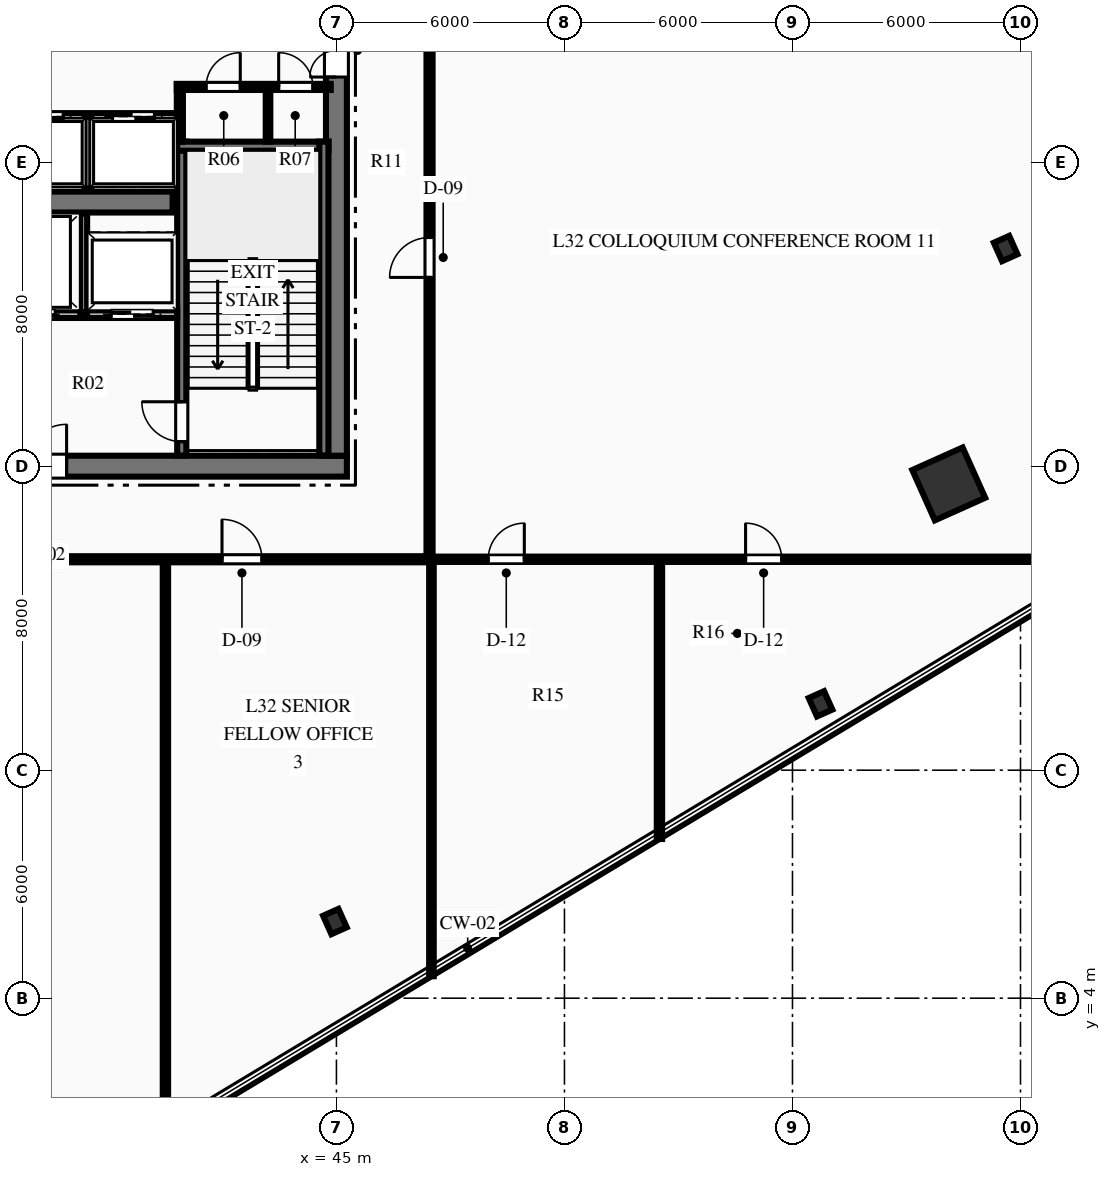
"""IFC4 building model, lengths in metres.
Left out: names, types, materials, properties, quantities, classifications, styles, units other than length and angle.
Written with IfcOpenShell. Run it as: python <this file> out.ifc"""

import sys

from ifc_helpers import new_model, si_unit, direction, frame, frame_2d, origin, origin_2d, place, context, subcontext, project, spatial, rectangle, hollow_rectangle, i_section, extrude, element, fill, save


model = new_model("IFC4")
c1 = context("Model", 3, precision=1e-05, world=origin(), true_north=direction((0.0, 1.0)))
c2 = subcontext(c1, "Body", "Model", "MODEL_VIEW")
j1 = project(units=[si_unit("LENGTHUNIT", "METRE"), si_unit("PLANEANGLEUNIT", "RADIAN")], contexts=[c1])
p1 = place(None, origin())
s1 = spatial("IfcSite", under=j1, at=p1, CompositionType="ELEMENT")
p2 = place(p1, origin())
s2 = spatial("IfcBuilding", under=s1, at=p2, CompositionType="ELEMENT")
p3 = place(p2, frame((0.0, 0.0, 131.7)))
s3 = spatial("IfcBuildingStorey", under=s2, at=p3, CompositionType="ELEMENT", Elevation=131.7)
p4 = place(p3, frame((26.725, 18.0, 0.0), z_axis=(0.0, 0.0, 1.0), x_axis=(1.0, 0.0, 0.0)))
e1 = element("IfcWall", 1, at=p4, inside=s3, PredefinedType="SHEAR", context=c2, shape_type="SweptSolid", body=[
    extrude(rectangle(XDim=18.55, YDim=0.55, at=frame_2d((9.275, 0.0))), origin(), (0.0, 0.0, 1.0), 4.5),
])
p5 = place(p4, frame((7.375, 0.0, 0.0)))
e2 = element("IfcOpeningElement", 2, at=p5, cuts=e1, PredefinedType="OPENING", context=c2, shape_type="SweptSolid", body=[
    extrude(rectangle(XDim=1.1, YDim=2.15, at=frame_2d((0.55, 1.075))), frame((0.0, 0.285, 0.0), z_axis=(0.0, -1.0, 0.0), x_axis=(1.0, 0.0, 0.0)), (0.0, 0.0, 1.0), 0.57),
])
p6 = place(p4, frame((10.075, 0.0, 0.0)))
e3 = element("IfcOpeningElement", 3, at=p6, cuts=e1, PredefinedType="OPENING", context=c2, shape_type="SweptSolid", body=[
    extrude(rectangle(XDim=1.1, YDim=2.15, at=frame_2d((0.55, 1.075))), frame((0.0, 0.285, 0.0), z_axis=(0.0, -1.0, 0.0), x_axis=(1.0, 0.0, 0.0)), (0.0, 0.0, 1.0), 0.57),
])
p7 = place(p3, frame((45.0, 18.275, 0.0), z_axis=(0.0, 0.0, 1.0), x_axis=(0.0, 1.0, 0.0)))
e4 = element("IfcWall", 4, at=p7, inside=s3, PredefinedType="SHEAR", context=c2, shape_type="SweptSolid", body=[
    extrude(rectangle(XDim=15.45, YDim=0.55, at=frame_2d((7.725, 0.0))), origin(), (0.0, 0.0, 1.0), 4.5),
])
p8 = place(p7, frame((9.965, 0.0, 0.0)))
e5 = element("IfcOpeningElement", 5, at=p8, cuts=e4, PredefinedType="OPENING", context=c2, shape_type="SweptSolid", body=[
    extrude(rectangle(XDim=1.4, YDim=2.2, at=frame_2d((0.7, 1.1))), frame((0.0, 0.285, 0.0), z_axis=(0.0, -1.0, 0.0), x_axis=(1.0, 0.0, 0.0)), (0.0, 0.0, 1.0), 0.57),
])
p9 = place(p3, frame((31.31, 24.95, 0.0), z_axis=(0.0, 0.0, 1.0), x_axis=(1.0, 0.0, 0.0)))
e6 = element("IfcWall", 6, at=p9, inside=s3, PredefinedType="SHEAR", context=c2, shape_type="SweptSolid", body=[
    extrude(rectangle(XDim=9.38, YDim=0.55, at=frame_2d((4.69, 0.0))), origin(), (0.0, 0.0, 1.0), 4.5),
])
p10 = place(p3, frame((40.93, 18.28, 0.0), z_axis=(0.0, 0.0, 1.0), x_axis=(0.0, 1.0, 0.0)))
e7 = element("IfcWall", 7, at=p10, inside=s3, PredefinedType="SHEAR", context=c2, shape_type="SweptSolid", body=[
    extrude(rectangle(XDim=8.26, YDim=0.24, at=frame_2d((4.13, 0.0))), origin(), (0.0, 0.0, 1.0), 4.5),
])
p11 = place(p10, frame((0.365, 0.0, 0.0)))
e8 = element("IfcOpeningElement", 8, at=p11, cuts=e7, PredefinedType="OPENING", context=c2, shape_type="SweptSolid", body=[
    extrude(rectangle(XDim=1.05, YDim=2.15, at=frame_2d((0.525, 1.075))), frame((0.0, 0.13, 0.0), z_axis=(0.0, -1.0, 0.0), x_axis=(1.0, 0.0, 0.0)), (0.0, 0.0, 1.0), 0.26),
])
p12 = place(p3, frame((40.81, 26.42, 0.0), z_axis=(0.0, 0.0, 1.0), x_axis=(1.0, 0.0, 0.0)))
e9 = element("IfcWall", 9, at=p12, inside=s3, PredefinedType="SHEAR", context=c2, shape_type="SweptSolid", body=[
    extrude(rectangle(XDim=3.98, YDim=0.24, at=frame_2d((1.99, 0.0))), origin(), (0.0, 0.0, 1.0), 4.5),
])
p13 = place(p3, frame((44.67, 18.28, 0.0), z_axis=(0.0, 0.0, 1.0), x_axis=(0.0, 1.0, 0.0)))
e10 = element("IfcWall", 10, at=p13, inside=s3, PredefinedType="SHEAR", context=c2, shape_type="SweptSolid", body=[
    extrude(rectangle(XDim=8.26, YDim=0.24, at=frame_2d((4.13, 0.0))), origin(), (0.0, 0.0, 1.0), 4.5),
])
p14 = place(p3, frame((61.112, 17.533, 0.0), z_axis=(0.0, 0.0, 1.0), x_axis=(0.912477494148, 0.409126902895, 0.0)))
e11 = element("IfcColumn", 11, at=p14, inside=s3, PredefinedType="COLUMN", context=c2, shape_type="SweptSolid", body=[
    extrude(hollow_rectangle(XDim=1.45, YDim=1.45, WallThickness=0.07, at=origin_2d()), origin(), (0.0, 0.0, 1.0), 4.5),
])
for number, where, z_axis, x_axis in (
    (12, (44.96, 6.017, 0.0), (0.0, 0.0, 1.0), (0.912, 0.409, 0.0)),
    (13, (57.738, 11.746, 0.0), (0.0, 0.0, 1.0), (0.912, 0.409, 0.0)),
    (14, (62.609, 23.727, 0.0), (0.0, 0.0, 1.0), (0.912, 0.409, 0.0)),
):
    element("IfcColumn", number, at=place(p3, frame(where, z_axis=z_axis, x_axis=x_axis)), inside=s3, PredefinedType="COLUMN", context=c2, shape_type="SweptSolid", body=[
        extrude(i_section(OverallWidth=0.442, OverallDepth=0.531, WebThickness=0.066, FlangeThickness=0.106, at=origin_2d()), origin(), (0.0, 0.0, 1.0), 4.5),
    ])
p15 = place(p3, frame((36.12, 22.0, 0.0), z_axis=(0.0, 0.0, 1.0), x_axis=(1.0, 0.0, 0.0)))
e15 = element("IfcWall", 15, at=p15, inside=s3, PredefinedType="PARTITIONING", context=c2, shape_type="SweptSolid", body=[
    extrude(rectangle(XDim=4.69, YDim=0.2, at=frame_2d((2.345, 0.0))), origin(), (0.0, 0.0, 1.0), 4.1),
])
p16 = place(p15, frame((2.955, 0.0, 0.0)))
e16 = element("IfcOpeningElement", 16, at=p16, cuts=e15, PredefinedType="OPENING", context=c2, shape_type="SweptSolid", body=[
    extrude(rectangle(XDim=1.1, YDim=2.15, at=frame_2d((0.55, 1.075))), frame((0.0, 0.11, 0.0), z_axis=(0.0, -1.0, 0.0), x_axis=(1.0, 0.0, 0.0)), (0.0, 0.0, 1.0), 0.22),
])
p17 = place(p15, frame((0.08, 0.0, 0.0)))
e17 = element("IfcOpeningElement", 17, at=p17, cuts=e15, PredefinedType="OPENING", context=c2, shape_type="SweptSolid", body=[
    extrude(rectangle(XDim=1.4, YDim=2.2, at=frame_2d((0.7, 1.1))), frame((0.0, 0.11, 0.0), z_axis=(0.0, -1.0, 0.0), x_axis=(1.0, 0.0, 0.0)), (0.0, 0.0, 1.0), 0.22),
])
p18 = place(p3, frame((38.35, 22.05, 0.0), z_axis=(0.0, 0.0, 1.0), x_axis=(0.0, 1.0, 0.0)))
e18 = element("IfcWall", 18, at=p18, inside=s3, PredefinedType="PARTITIONING", context=c2, shape_type="SweptSolid", body=[
    extrude(rectangle(XDim=2.6, YDim=0.18, at=frame_2d((1.3, 0.0))), origin(), (0.0, 0.0, 1.0), 4.1),
])
p19 = place(p3, frame((40.8, 27.98, 0.0), z_axis=(0.0, 0.0, 1.0), x_axis=(1.0, 0.0, 0.0)))
e19 = element("IfcWall", 19, at=p19, inside=s3, PredefinedType="PARTITIONING", context=c2, shape_type="SweptSolid", body=[
    extrude(rectangle(XDim=4.05, YDim=0.16, at=frame_2d((2.025, 0.0))), origin(), (0.0, 0.0, 1.0), 4.1),
])
p20 = place(p19, frame((0.77, 0.0, 0.0)))
e20 = element("IfcOpeningElement", 20, at=p20, cuts=e19, PredefinedType="OPENING", context=c2, shape_type="SweptSolid", body=[
    extrude(rectangle(XDim=0.9, YDim=2.15, at=frame_2d((0.45, 1.075))), frame((0.0, 0.09, 0.0), z_axis=(0.0, -1.0, 0.0), x_axis=(1.0, 0.0, 0.0)), (0.0, 0.0, 1.0), 0.18),
])
p21 = place(p19, frame((2.68, 0.0, 0.0)))
e21 = element("IfcOpeningElement", 21, at=p21, cuts=e19, PredefinedType="OPENING", context=c2, shape_type="SweptSolid", body=[
    extrude(rectangle(XDim=0.9, YDim=2.15, at=frame_2d((0.45, 1.075))), frame((0.0, 0.09, 0.0), z_axis=(0.0, -1.0, 0.0), x_axis=(1.0, 0.0, 0.0)), (0.0, 0.0, 1.0), 0.18),
])
p22 = place(p3, frame((40.88, 26.54, 0.0), z_axis=(0.0, 0.0, 1.0), x_axis=(0.0, 1.0, 0.0)))
e22 = element("IfcWall", 22, at=p22, inside=s3, PredefinedType="PARTITIONING", context=c2, shape_type="SweptSolid", body=[
    extrude(rectangle(XDim=1.51, YDim=0.16, at=frame_2d((0.755, 0.0))), origin(), (0.0, 0.0, 1.0), 4.1),
])
p23 = place(p3, frame((43.2, 26.54, 0.0), z_axis=(0.0, 0.0, 1.0), x_axis=(0.0, 1.0, 0.0)))
e23 = element("IfcWall", 23, at=p23, inside=s3, PredefinedType="PARTITIONING", context=c2, shape_type="SweptSolid", body=[
    extrude(rectangle(XDim=1.44, YDim=0.12, at=frame_2d((0.72, 0.0))), origin(), (0.0, 0.0, 1.0), 4.1),
])
p24 = place(p3, frame((31.2, 27.2, 0.0), z_axis=(0.0, 0.0, 1.0), x_axis=(1.0, 0.0, 0.0)))
e24 = element("IfcWall", 24, at=p24, inside=s3, PredefinedType="PARTITIONING", context=c2, shape_type="SweptSolid", body=[
    extrude(rectangle(XDim=9.6, YDim=0.18, at=frame_2d((4.8, 0.0))), origin(), (0.0, 0.0, 1.0), 4.1),
])
p25 = place(p24, frame((0.59, 0.0, 0.0)))
e25 = element("IfcOpeningElement", 25, at=p25, cuts=e24, PredefinedType="OPENING", context=c2, shape_type="SweptSolid", body=[
    extrude(rectangle(XDim=1.1, YDim=2.15, at=frame_2d((0.55, 1.075))), frame((0.0, 0.1, 0.0), z_axis=(0.0, -1.0, 0.0), x_axis=(1.0, 0.0, 0.0)), (0.0, 0.0, 1.0), 0.2),
])
p26 = place(p24, frame((2.99, 0.0, 0.0)))
e26 = element("IfcOpeningElement", 26, at=p26, cuts=e24, PredefinedType="OPENING", context=c2, shape_type="SweptSolid", body=[
    extrude(rectangle(XDim=1.1, YDim=2.15, at=frame_2d((0.55, 1.075))), frame((0.0, 0.1, 0.0), z_axis=(0.0, -1.0, 0.0), x_axis=(1.0, 0.0, 0.0)), (0.0, 0.0, 1.0), 0.2),
])
p27 = place(p24, frame((5.51, 0.0, 0.0)))
e27 = element("IfcOpeningElement", 27, at=p27, cuts=e24, PredefinedType="OPENING", context=c2, shape_type="SweptSolid", body=[
    extrude(rectangle(XDim=1.1, YDim=2.15, at=frame_2d((0.55, 1.075))), frame((0.0, 0.1, 0.0), z_axis=(0.0, -1.0, 0.0), x_axis=(1.0, 0.0, 0.0)), (0.0, 0.0, 1.0), 0.2),
])
p28 = place(p24, frame((7.91, 0.0, 0.0)))
e28 = element("IfcOpeningElement", 28, at=p28, cuts=e24, PredefinedType="OPENING", context=c2, shape_type="SweptSolid", body=[
    extrude(rectangle(XDim=1.1, YDim=2.15, at=frame_2d((0.55, 1.075))), frame((0.0, 0.1, 0.0), z_axis=(0.0, -1.0, 0.0), x_axis=(1.0, 0.0, 0.0)), (0.0, 0.0, 1.0), 0.2),
])
p29 = place(p3, frame((38.46, 25.3, 0.0), z_axis=(0.0, 0.0, 1.0), x_axis=(0.0, 1.0, 0.0)))
e29 = element("IfcWall", 29, at=p29, inside=s3, PredefinedType="PARTITIONING", context=c2, shape_type="SweptSolid", body=[
    extrude(rectangle(XDim=1.9, YDim=0.18, at=frame_2d((0.95, 0.0))), origin(), (0.0, 0.0, 1.0), 4.1),
])
p30 = place(p3, frame((24.5, 15.55, 0.0), z_axis=(0.0, 0.0, 1.0), x_axis=(1.0, 0.0, 0.0)))
e30 = element("IfcWall", 30, at=p30, inside=s3, PredefinedType="PARTITIONING", context=c2, shape_type="SweptSolid", body=[
    extrude(rectangle(XDim=23.0, YDim=0.16, at=frame_2d((11.5, 0.0))), origin(), (0.0, 0.0, 1.0), 4.1),
])
p31 = place(p30, frame((7.725, 0.0, 0.0)))
e31 = element("IfcOpeningElement", 31, at=p31, cuts=e30, PredefinedType="OPENING", context=c2, shape_type="SweptSolid", body=[
    extrude(rectangle(XDim=1.05, YDim=2.15, at=frame_2d((0.525, 1.075))), frame((0.0, 0.09, 0.0), z_axis=(0.0, -1.0, 0.0), x_axis=(1.0, 0.0, 0.0)), (0.0, 0.0, 1.0), 0.18),
])
p32 = place(p30, frame((17.489, 0.0, 0.0)))
e32 = element("IfcOpeningElement", 32, at=p32, cuts=e30, PredefinedType="OPENING", context=c2, shape_type="SweptSolid", body=[
    extrude(rectangle(XDim=1.05, YDim=2.15, at=frame_2d((0.525, 1.075))), frame((0.0, 0.09, 0.0), z_axis=(0.0, -1.0, 0.0), x_axis=(1.0, 0.0, 0.0)), (0.0, 0.0, 1.0), 0.18),
])
p33 = place(p3, frame((47.45, 15.55, 0.0), z_axis=(0.0, 0.0, 1.0), x_axis=(0.0, 1.0, 0.0)))
e33 = element("IfcWall", 33, at=p33, inside=s3, PredefinedType="PARTITIONING", context=c2, shape_type="SweptSolid", body=[
    extrude(rectangle(XDim=20.9, YDim=0.16, at=frame_2d((10.45, 0.0))), origin(), (0.0, 0.0, 1.0), 4.1),
])
p34 = place(p33, frame((7.417, 0.0, 0.0)))
e34 = element("IfcOpeningElement", 34, at=p34, cuts=e33, PredefinedType="OPENING", context=c2, shape_type="SweptSolid", body=[
    extrude(rectangle(XDim=1.05, YDim=2.15, at=frame_2d((0.525, 1.075))), frame((0.0, 0.09, 0.0), z_axis=(0.0, -1.0, 0.0), x_axis=(1.0, 0.0, 0.0)), (0.0, 0.0, 1.0), 0.18),
])
p35 = place(p3, frame((47.45, 15.55, 0.0), z_axis=(0.0, 0.0, 1.0), x_axis=(1.0, 0.0, 0.0)))
e35 = element("IfcWall", 35, at=p35, inside=s3, PredefinedType="PARTITIONING", context=c2, shape_type="SweptSolid", body=[
    extrude(rectangle(XDim=18.276, YDim=0.14, at=frame_2d((9.138, 0.0))), origin(), (0.0, 0.0, 1.0), 4.1),
])
p36 = place(p35, frame((1.544, 0.0, 0.0)))
e36 = element("IfcOpeningElement", 36, at=p36, cuts=e35, PredefinedType="OPENING", context=c2, shape_type="SweptSolid", body=[
    extrude(rectangle(XDim=0.95, YDim=2.15, at=frame_2d((0.475, 1.075))), frame((0.0, 0.08, 0.0), z_axis=(0.0, -1.0, 0.0), x_axis=(1.0, 0.0, 0.0)), (0.0, 0.0, 1.0), 0.16),
])
p37 = place(p35, frame((8.316, 0.0, 0.0)))
e37 = element("IfcOpeningElement", 37, at=p37, cuts=e35, PredefinedType="OPENING", context=c2, shape_type="SweptSolid", body=[
    extrude(rectangle(XDim=0.95, YDim=2.15, at=frame_2d((0.475, 1.075))), frame((0.0, 0.08, 0.0), z_axis=(0.0, -1.0, 0.0), x_axis=(1.0, 0.0, 0.0)), (0.0, 0.0, 1.0), 0.16),
])
p38 = place(p3, frame((40.5, 0.363, 0.0), z_axis=(0.0, 0.0, 1.0), x_axis=(0.0, 1.0, 0.0)))
e38 = element("IfcWall", 38, at=p38, inside=s3, PredefinedType="PARTITIONING", context=c2, shape_type="SweptSolid", body=[
    extrude(rectangle(XDim=15.187, YDim=0.14, at=frame_2d((7.594, 0.0))), origin(), (0.0, 0.0, 1.0), 4.1),
])
p39 = place(p3, frame((47.5, 4.577, 0.0), z_axis=(0.0, 0.0, 1.0), x_axis=(0.0, 1.0, 0.0)))
e39 = element("IfcWall", 39, at=p39, inside=s3, PredefinedType="PARTITIONING", context=c2, shape_type="SweptSolid", body=[
    extrude(rectangle(XDim=10.973, YDim=0.12, at=frame_2d((5.487, 0.0))), origin(), (0.0, 0.0, 1.0), 4.1),
])
p40 = place(p3, frame((53.5, 8.189, 0.0), z_axis=(0.0, 0.0, 1.0), x_axis=(0.0, 1.0, 0.0)))
e40 = element("IfcWall", 40, at=p40, inside=s3, PredefinedType="PARTITIONING", context=c2, shape_type="SweptSolid", body=[
    extrude(rectangle(XDim=7.361, YDim=0.14, at=frame_2d((3.68, 0.0))), origin(), (0.0, 0.0, 1.0), 4.1),
])
p41 = place(p20, origin())
e41 = element("IfcDoor", 41, at=p41, inside=s3, OperationType="SINGLE_SWING_RIGHT", PredefinedType="DOOR", context=c2, shape_type="SweptSolid", body=[
    extrude(rectangle(XDim=0.9, YDim=2.15, at=frame_2d((0.45, 1.075))), frame((0.0, 0.025, 0.0), z_axis=(0.0, -1.0, 0.0), x_axis=(1.0, 0.0, 0.0)), (0.0, 0.0, 1.0), 0.05),
])
fill(e20, e41)
p42 = place(p21, origin())
e42 = element("IfcDoor", 42, at=p42, inside=s3, OperationType="SINGLE_SWING_LEFT", PredefinedType="DOOR", context=c2, shape_type="SweptSolid", body=[
    extrude(rectangle(XDim=0.9, YDim=2.15, at=frame_2d((0.45, 1.075))), frame((0.0, 0.025, 0.0), z_axis=(0.0, -1.0, 0.0), x_axis=(1.0, 0.0, 0.0)), (0.0, 0.0, 1.0), 0.05),
])
fill(e21, e42)
p43 = place(p11, origin())
e43 = element("IfcDoor", 43, at=p43, inside=s3, OperationType="SINGLE_SWING_RIGHT", PredefinedType="DOOR", context=c2, shape_type="SweptSolid", body=[
    extrude(rectangle(XDim=1.05, YDim=2.15, at=frame_2d((0.525, 1.075))), frame((0.0, 0.025, 0.0), z_axis=(0.0, -1.0, 0.0), x_axis=(1.0, 0.0, 0.0)), (0.0, 0.0, 1.0), 0.05),
])
fill(e8, e43)
p44 = place(p6, origin())
e44 = element("IfcDoor", 44, at=p44, inside=s3, OperationType="SINGLE_SWING_RIGHT", PredefinedType="DOOR", context=c2, shape_type="SweptSolid", body=[
    extrude(rectangle(XDim=1.1, YDim=2.15, at=frame_2d((0.55, 1.075))), frame((0.0, 0.025, 0.0), z_axis=(0.0, -1.0, 0.0), x_axis=(1.0, 0.0, 0.0)), (0.0, 0.0, 1.0), 0.05),
])
fill(e3, e44)
p45 = place(p8, origin())
e45 = element("IfcDoor", 45, at=p45, inside=s3, OperationType="DOUBLE_DOOR_SINGLE_SWING", PredefinedType="DOOR", context=c2, shape_type="SweptSolid", body=[
    extrude(rectangle(XDim=1.4, YDim=2.2, at=frame_2d((0.7, 1.1))), frame((0.0, 0.025, 0.0), z_axis=(0.0, -1.0, 0.0), x_axis=(1.0, 0.0, 0.0)), (0.0, 0.0, 1.0), 0.05),
])
fill(e5, e45)
p46 = place(p32, origin())
e46 = element("IfcDoor", 46, at=p46, inside=s3, OperationType="SINGLE_SWING_LEFT", PredefinedType="DOOR", context=c2, shape_type="SweptSolid", body=[
    extrude(rectangle(XDim=1.05, YDim=2.15, at=frame_2d((0.525, 1.075))), frame((0.0, 0.025, 0.0), z_axis=(0.0, -1.0, 0.0), x_axis=(1.0, 0.0, 0.0)), (0.0, 0.0, 1.0), 0.05),
])
fill(e32, e46)
p47 = place(p36, origin())
e47 = element("IfcDoor", 47, at=p47, inside=s3, OperationType="SINGLE_SWING_RIGHT", PredefinedType="DOOR", context=c2, shape_type="SweptSolid", body=[
    extrude(rectangle(XDim=0.95, YDim=2.15, at=frame_2d((0.475, 1.075))), frame((0.0, 0.025, 0.0), z_axis=(0.0, -1.0, 0.0), x_axis=(1.0, 0.0, 0.0)), (0.0, 0.0, 1.0), 0.05),
])
fill(e36, e47)
p48 = place(p37, origin())
e48 = element("IfcDoor", 48, at=p48, inside=s3, OperationType="SINGLE_SWING_LEFT", PredefinedType="DOOR", context=c2, shape_type="SweptSolid", body=[
    extrude(rectangle(XDim=0.95, YDim=2.15, at=frame_2d((0.475, 1.075))), frame((0.0, 0.025, 0.0), z_axis=(0.0, -1.0, 0.0), x_axis=(1.0, 0.0, 0.0)), (0.0, 0.0, 1.0), 0.05),
])
fill(e37, e48)
p49 = place(p34, origin())
e49 = element("IfcDoor", 49, at=p49, inside=s3, OperationType="SINGLE_SWING_LEFT", PredefinedType="DOOR", context=c2, shape_type="SweptSolid", body=[
    extrude(rectangle(XDim=1.05, YDim=2.15, at=frame_2d((0.525, 1.075))), frame((0.0, 0.025, 0.0), z_axis=(0.0, -1.0, 0.0), x_axis=(1.0, 0.0, 0.0)), (0.0, 0.0, 1.0), 0.05),
])
fill(e34, e49)
p50 = place(p27, origin())
e50 = element("IfcDoor", 50, at=p50, inside=s3, OperationType="SLIDING_TO_LEFT", PredefinedType="DOOR", context=c2, shape_type="SweptSolid", body=[
    extrude(rectangle(XDim=1.1, YDim=2.15, at=frame_2d((0.55, 1.075))), frame((0.0, 0.025, 0.0), z_axis=(0.0, -1.0, 0.0), x_axis=(1.0, 0.0, 0.0)), (0.0, 0.0, 1.0), 0.05),
])
fill(e27, e50)
p51 = place(p28, origin())
e51 = element("IfcDoor", 51, at=p51, inside=s3, OperationType="SLIDING_TO_LEFT", PredefinedType="DOOR", context=c2, shape_type="SweptSolid", body=[
    extrude(rectangle(XDim=1.1, YDim=2.15, at=frame_2d((0.55, 1.075))), frame((0.0, 0.025, 0.0), z_axis=(0.0, -1.0, 0.0), x_axis=(1.0, 0.0, 0.0)), (0.0, 0.0, 1.0), 0.05),
])
fill(e28, e51)
p52 = place(p16, origin())
e52 = element("IfcDoor", 52, at=p52, inside=s3, OperationType="SLIDING_TO_LEFT", PredefinedType="DOOR", context=c2, shape_type="SweptSolid", body=[
    extrude(rectangle(XDim=1.1, YDim=2.15, at=frame_2d((0.55, 1.075))), frame((0.0, 0.025, 0.0), z_axis=(0.0, -1.0, 0.0), x_axis=(1.0, 0.0, 0.0)), (0.0, 0.0, 1.0), 0.05),
])
fill(e16, e52)
p53 = place(p17, origin())
e53 = element("IfcDoor", 53, at=p53, inside=s3, OperationType="SLIDING_TO_LEFT", PredefinedType="DOOR", context=c2, shape_type="SweptSolid", body=[
    extrude(rectangle(XDim=1.4, YDim=2.2, at=frame_2d((0.7, 1.1))), frame((0.0, 0.025, 0.0), z_axis=(0.0, -1.0, 0.0), x_axis=(1.0, 0.0, 0.0)), (0.0, 0.0, 1.0), 0.05),
])
fill(e17, e53)
save(model, sys.argv[1])
